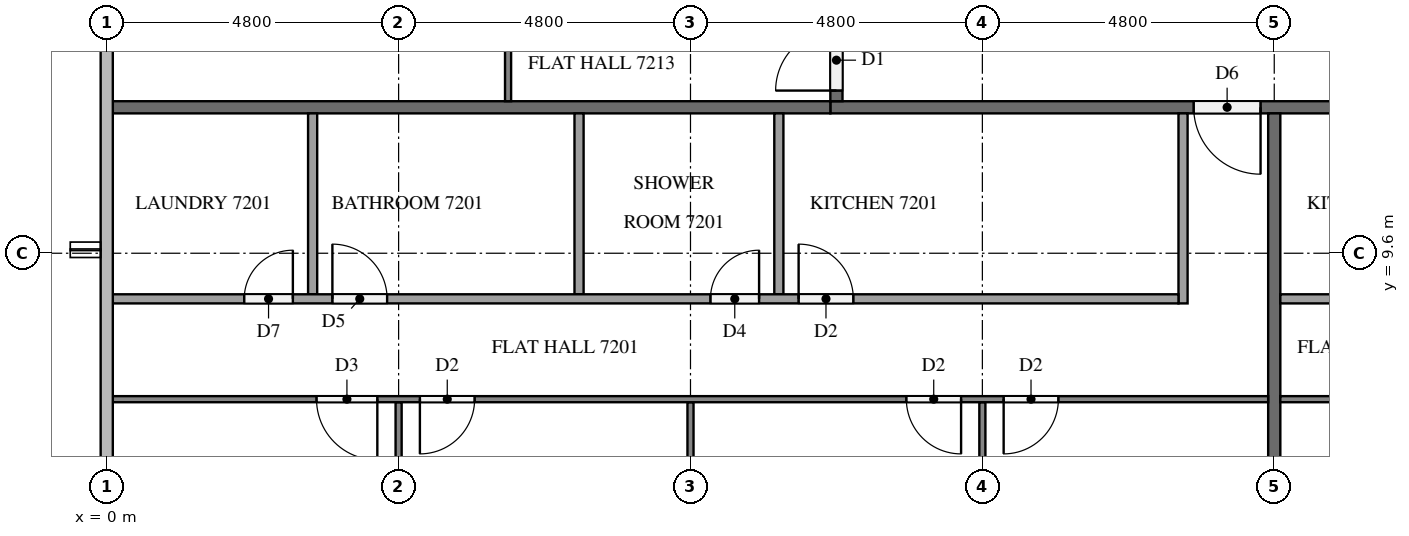
"""IFC4 building model, lengths in metres.
Left out: names, types, materials, properties, quantities, classifications, styles, units other than length and angle.
Written with IfcOpenShell. Run it as: python <this file> out.ifc"""

import sys

from ifc_helpers import new_model, si_unit, direction, frame, frame_2d, origin, place, context, subcontext, project, spatial, rectangle, extrude, element, fill, save


model = new_model("IFC4")
c1 = context("Model", 3, precision=1e-05, world=origin(), true_north=direction((0.0, 1.0)))
c2 = subcontext(c1, "Body", "Model", "MODEL_VIEW")
j1 = project(units=[si_unit("LENGTHUNIT", "METRE"), si_unit("PLANEANGLEUNIT", "RADIAN")], contexts=[c1])
p1 = place(None, origin())
s1 = spatial("IfcSite", under=j1, at=p1, CompositionType="ELEMENT")
p2 = place(p1, origin())
s2 = spatial("IfcBuilding", under=s1, at=p2, CompositionType="ELEMENT")
p3 = place(p2, frame((0.0, 0.0, 275.6)))
s3 = spatial("IfcBuildingStorey", under=s2, at=p3, CompositionType="ELEMENT", Elevation=275.6)
p4 = place(p3, frame((50.5, 12.0, 0.0), z_axis=(0.0, 0.0, 1.0), x_axis=(-1.0, 0.0, 0.0)))
e1 = element("IfcWall", 1, at=p4, inside=s3, PredefinedType="PARTITIONING", context=c2, shape_type="SweptSolid", body=[
    extrude(rectangle(XDim=38.6, YDim=0.2, at=frame_2d((19.3, 0.0))), origin(), (0.0, 0.0, 1.0), 3.2),
])
p5 = place(p4, frame((31.525, 0.0, 0.0)))
e2 = element("IfcOpeningElement", 2, at=p5, cuts=e1, PredefinedType="OPENING", context=c2, shape_type="SweptSolid", body=[
    extrude(rectangle(XDim=1.1, YDim=2.1, at=frame_2d((0.55, 1.05))), frame((0.0, 0.11, 0.0), z_axis=(0.0, -1.0, 0.0), x_axis=(1.0, 0.0, 0.0)), (0.0, 0.0, 1.0), 0.22),
])
p6 = place(p4, frame((19.575, 0.0, 0.0)))
e3 = element("IfcOpeningElement", 3, at=p6, cuts=e1, PredefinedType="OPENING", context=c2, shape_type="SweptSolid", body=[
    extrude(rectangle(XDim=1.0, YDim=2.1, at=frame_2d((0.5, 1.05))), frame((0.0, 0.11, 0.0), z_axis=(0.0, -1.0, 0.0), x_axis=(1.0, 0.0, 0.0)), (0.0, 0.0, 1.0), 0.22),
])
p7 = place(p4, frame((18.025, 0.0, 0.0)))
e4 = element("IfcOpeningElement", 4, at=p7, cuts=e1, PredefinedType="OPENING", context=c2, shape_type="SweptSolid", body=[
    extrude(rectangle(XDim=1.0, YDim=2.1, at=frame_2d((0.5, 1.05))), frame((0.0, 0.11, 0.0), z_axis=(0.0, -1.0, 0.0), x_axis=(1.0, 0.0, 0.0)), (0.0, 0.0, 1.0), 0.22),
])
p8 = place(p4, frame((1.225, 0.0, 0.0)))
e5 = element("IfcOpeningElement", 5, at=p8, cuts=e1, PredefinedType="OPENING", context=c2, shape_type="SweptSolid", body=[
    extrude(rectangle(XDim=1.0, YDim=2.1, at=frame_2d((0.5, 1.05))), frame((0.0, 0.11, 0.0), z_axis=(0.0, -1.0, 0.0), x_axis=(1.0, 0.0, 0.0)), (0.0, 0.0, 1.0), 0.22),
])
p9 = place(p3, frame((12.0, 12.1, 0.0), z_axis=(0.0, 0.0, 1.0), x_axis=(0.0, 1.0, 0.0)))
e6 = element("IfcWall", 6, at=p9, inside=s3, PredefinedType="PARTITIONING", context=c2, shape_type="SweptSolid", body=[
    extrude(rectangle(XDim=28.6, YDim=0.2, at=frame_2d((14.3, 0.0))), origin(), (0.0, 0.0, 1.0), 3.2),
])
p10 = place(p9, frame((24.175, 0.0, 0.0)))
e7 = element("IfcOpeningElement", 7, at=p10, cuts=e6, PredefinedType="OPENING", context=c2, shape_type="SweptSolid", body=[
    extrude(rectangle(XDim=1.0, YDim=2.1, at=frame_2d((0.5, 1.05))), frame((0.0, 0.11, 0.0), z_axis=(0.0, -1.0, 0.0), x_axis=(1.0, 0.0, 0.0)), (0.0, 0.0, 1.0), 0.22),
])
p11 = place(p9, frame((14.575, 0.0, 0.0)))
e8 = element("IfcOpeningElement", 8, at=p11, cuts=e6, PredefinedType="OPENING", context=c2, shape_type="SweptSolid", body=[
    extrude(rectangle(XDim=1.0, YDim=2.1, at=frame_2d((0.5, 1.05))), frame((0.0, 0.11, 0.0), z_axis=(0.0, -1.0, 0.0), x_axis=(1.0, 0.0, 0.0)), (0.0, 0.0, 1.0), 0.22),
])
p12 = place(p9, frame((0.175, 0.0, 0.0)))
e9 = element("IfcOpeningElement", 9, at=p12, cuts=e6, PredefinedType="OPENING", context=c2, shape_type="SweptSolid", body=[
    extrude(rectangle(XDim=1.0, YDim=2.1, at=frame_2d((0.5, 1.05))), frame((0.0, 0.11, 0.0), z_axis=(0.0, -1.0, 0.0), x_axis=(1.0, 0.0, 0.0)), (0.0, 0.0, 1.0), 0.22),
])
for number, where, z_axis, x_axis in (
    (10, (19.2, 11.9, 0.0), (0.0, 0.0, 1.0), (0.0, -1.0, 0.0)),
    (11, (0.1, 12.0, 0.0), (0.0, 0.0, 1.0), (1.0, 0.0, 0.0)),
):
    element("IfcWall", number, at=place(p3, frame(where, z_axis=z_axis, x_axis=x_axis)), inside=s3, PredefinedType="PARTITIONING", context=c2, shape_type="SweptSolid", body=[
        extrude(rectangle(XDim=11.8, YDim=0.2, at=frame_2d((5.9, 0.0))), origin(), (0.0, 0.0, 1.0), 3.2),
    ])
p13 = place(p3, frame((14.4, 7.15, 0.0), z_axis=(0.0, 0.0, 1.0), x_axis=(0.0, -1.0, 0.0)))
e12 = element("IfcWall", 12, at=p13, inside=s3, PredefinedType="PARTITIONING", context=c2, shape_type="SweptSolid", body=[
    extrude(rectangle(XDim=6.9, YDim=0.1, at=frame_2d((3.45, 0.0))), origin(), (0.0, 0.0, 1.0), 3.2),
])
p14 = place(p3, frame((9.6, 7.15, 0.0), z_axis=(0.0, 0.0, 1.0), x_axis=(0.0, -1.0, 0.0)))
e13 = element("IfcWall", 13, at=p14, inside=s3, PredefinedType="PARTITIONING", context=c2, shape_type="SweptSolid", body=[
    extrude(rectangle(XDim=7.05, YDim=0.1, at=frame_2d((3.525, 0.0))), origin(), (0.0, 0.0, 1.0), 3.2),
])
p15 = place(p3, frame((4.8, 7.15, 0.0), z_axis=(0.0, 0.0, 1.0), x_axis=(0.0, -1.0, 0.0)))
e14 = element("IfcWall", 14, at=p15, inside=s3, PredefinedType="PARTITIONING", context=c2, shape_type="SweptSolid", body=[
    extrude(rectangle(XDim=6.85, YDim=0.1, at=frame_2d((3.425, 0.0))), origin(), (0.0, 0.0, 1.0), 3.2),
])
p16 = place(p3, frame((19.1, 7.2, 0.0), z_axis=(0.0, 0.0, 1.0), x_axis=(-1.0, 0.0, 0.0)))
e15 = element("IfcWall", 15, at=p16, inside=s3, PredefinedType="PARTITIONING", context=c2, shape_type="SweptSolid", body=[
    extrude(rectangle(XDim=19.0, YDim=0.1, at=frame_2d((9.5, 0.0))), origin(), (0.0, 0.0, 1.0), 3.2),
])
p17 = place(p16, frame((3.45, 0.0, 0.0)))
e16 = element("IfcOpeningElement", 16, at=p17, cuts=e15, PredefinedType="OPENING", context=c2, shape_type="SweptSolid", body=[
    extrude(rectangle(XDim=0.9, YDim=2.1, at=frame_2d((0.45, 1.05))), frame((0.0, 0.06, 0.0), z_axis=(0.0, -1.0, 0.0), x_axis=(1.0, 0.0, 0.0)), (0.0, 0.0, 1.0), 0.12),
])
p18 = place(p16, frame((5.05, 0.0, 0.0)))
e17 = element("IfcOpeningElement", 17, at=p18, cuts=e15, PredefinedType="OPENING", context=c2, shape_type="SweptSolid", body=[
    extrude(rectangle(XDim=0.9, YDim=2.1, at=frame_2d((0.45, 1.05))), frame((0.0, 0.06, 0.0), z_axis=(0.0, -1.0, 0.0), x_axis=(1.0, 0.0, 0.0)), (0.0, 0.0, 1.0), 0.12),
])
p19 = place(p16, frame((13.05, 0.0, 0.0)))
e18 = element("IfcOpeningElement", 18, at=p19, cuts=e15, PredefinedType="OPENING", context=c2, shape_type="SweptSolid", body=[
    extrude(rectangle(XDim=0.9, YDim=2.1, at=frame_2d((0.45, 1.05))), frame((0.0, 0.06, 0.0), z_axis=(0.0, -1.0, 0.0), x_axis=(1.0, 0.0, 0.0)), (0.0, 0.0, 1.0), 0.12),
])
p20 = place(p16, frame((14.65, 0.0, 0.0)))
e19 = element("IfcOpeningElement", 19, at=p20, cuts=e15, PredefinedType="OPENING", context=c2, shape_type="SweptSolid", body=[
    extrude(rectangle(XDim=1.0, YDim=2.1, at=frame_2d((0.5, 1.05))), frame((0.0, 0.06, 0.0), z_axis=(0.0, -1.0, 0.0), x_axis=(1.0, 0.0, 0.0)), (0.0, 0.0, 1.0), 0.12),
])
for number, where, z_axis, x_axis in (
    (20, (11.053, 11.9, 0.0), (0.0, 0.0, 1.0), (0.0, -1.0, 0.0)),
    (21, (7.767, 11.9, 0.0), (0.0, 0.0, 1.0), (0.0, -1.0, 0.0)),
    (22, (3.386, 11.9, 0.0), (0.0, 0.0, 1.0), (0.0, -1.0, 0.0)),
):
    element("IfcWall", number, at=place(p3, frame(where, z_axis=z_axis, x_axis=x_axis)), inside=s3, PredefinedType="PARTITIONING", context=c2, shape_type="SweptSolid", body=[
        extrude(rectangle(XDim=2.975, YDim=0.15, at=frame_2d((1.487, 0.0))), origin(), (0.0, 0.0, 1.0), 3.2),
    ])
p21 = place(p3, frame((17.7, 11.9, 0.0), z_axis=(0.0, 0.0, 1.0), x_axis=(0.0, -1.0, 0.0)))
e23 = element("IfcWall", 23, at=p21, inside=s3, PredefinedType="PARTITIONING", context=c2, shape_type="SweptSolid", body=[
    extrude(rectangle(XDim=3.125, YDim=0.15, at=frame_2d((1.562, 0.0))), origin(), (0.0, 0.0, 1.0), 3.2),
])
p22 = place(p3, frame((0.1, 8.85, 0.0), z_axis=(0.0, 0.0, 1.0), x_axis=(1.0, 0.0, 0.0)))
e24 = element("IfcWall", 24, at=p22, inside=s3, PredefinedType="PARTITIONING", context=c2, shape_type="SweptSolid", body=[
    extrude(rectangle(XDim=17.525, YDim=0.15, at=frame_2d((8.762, 0.0))), origin(), (0.0, 0.0, 1.0), 3.2),
])
p23 = place(p22, frame((11.278, 0.0, 0.0)))
e25 = element("IfcOpeningElement", 25, at=p23, cuts=e24, PredefinedType="OPENING", context=c2, shape_type="SweptSolid", body=[
    extrude(rectangle(XDim=0.9, YDim=2.1, at=frame_2d((0.45, 1.05))), frame((0.0, 0.085, 0.0), z_axis=(0.0, -1.0, 0.0), x_axis=(1.0, 0.0, 0.0)), (0.0, 0.0, 1.0), 0.17),
])
p24 = place(p22, frame((9.828, 0.0, 0.0)))
e26 = element("IfcOpeningElement", 26, at=p24, cuts=e24, PredefinedType="OPENING", context=c2, shape_type="SweptSolid", body=[
    extrude(rectangle(XDim=0.8, YDim=2.1, at=frame_2d((0.4, 1.05))), frame((0.0, 0.085, 0.0), z_axis=(0.0, -1.0, 0.0), x_axis=(1.0, 0.0, 0.0)), (0.0, 0.0, 1.0), 0.17),
])
p25 = place(p22, frame((3.611, 0.0, 0.0)))
e27 = element("IfcOpeningElement", 27, at=p25, cuts=e24, PredefinedType="OPENING", context=c2, shape_type="SweptSolid", body=[
    extrude(rectangle(XDim=0.9, YDim=2.1, at=frame_2d((0.45, 1.05))), frame((0.0, 0.085, 0.0), z_axis=(0.0, -1.0, 0.0), x_axis=(1.0, 0.0, 0.0)), (0.0, 0.0, 1.0), 0.17),
])
p26 = place(p22, frame((2.161, 0.0, 0.0)))
e28 = element("IfcOpeningElement", 28, at=p26, cuts=e24, PredefinedType="OPENING", context=c2, shape_type="SweptSolid", body=[
    extrude(rectangle(XDim=0.8, YDim=2.1, at=frame_2d((0.4, 1.05))), frame((0.0, 0.085, 0.0), z_axis=(0.0, -1.0, 0.0), x_axis=(1.0, 0.0, 0.0)), (0.0, 0.0, 1.0), 0.17),
])
p27 = place(p3, frame((31.1, 7.2, 0.0), z_axis=(0.0, 0.0, 1.0), x_axis=(-1.0, 0.0, 0.0)))
e29 = element("IfcWall", 29, at=p27, inside=s3, PredefinedType="PARTITIONING", context=c2, shape_type="SweptSolid", body=[
    extrude(rectangle(XDim=11.8, YDim=0.1, at=frame_2d((5.9, 0.0))), origin(), (0.0, 0.0, 1.0), 3.2),
])
p28 = place(p27, frame((3.45, 0.0, 0.0)))
e30 = element("IfcOpeningElement", 30, at=p28, cuts=e29, PredefinedType="OPENING", context=c2, shape_type="SweptSolid", body=[
    extrude(rectangle(XDim=0.9, YDim=2.1, at=frame_2d((0.45, 1.05))), frame((0.0, 0.06, 0.0), z_axis=(0.0, -1.0, 0.0), x_axis=(1.0, 0.0, 0.0)), (0.0, 0.0, 1.0), 0.12),
])
p29 = place(p27, frame((5.05, 0.0, 0.0)))
e31 = element("IfcOpeningElement", 31, at=p29, cuts=e29, PredefinedType="OPENING", context=c2, shape_type="SweptSolid", body=[
    extrude(rectangle(XDim=1.0, YDim=2.1, at=frame_2d((0.5, 1.05))), frame((0.0, 0.06, 0.0), z_axis=(0.0, -1.0, 0.0), x_axis=(1.0, 0.0, 0.0)), (0.0, 0.0, 1.0), 0.12),
])
p30 = place(p3, frame((19.3, 8.85, 0.0), z_axis=(0.0, 0.0, 1.0), x_axis=(1.0, 0.0, 0.0)))
e32 = element("IfcWall", 32, at=p30, inside=s3, PredefinedType="PARTITIONING", context=c2, shape_type="SweptSolid", body=[
    extrude(rectangle(XDim=10.325, YDim=0.15, at=frame_2d((5.163, 0.0))), origin(), (0.0, 0.0, 1.0), 3.2),
])
p31 = place(p30, frame((6.52, 0.0, 0.0)))
e33 = element("IfcOpeningElement", 33, at=p31, cuts=e32, PredefinedType="OPENING", context=c2, shape_type="SweptSolid", body=[
    extrude(rectangle(XDim=0.8, YDim=2.1, at=frame_2d((0.4, 1.05))), frame((0.0, 0.085, 0.0), z_axis=(0.0, -1.0, 0.0), x_axis=(1.0, 0.0, 0.0)), (0.0, 0.0, 1.0), 0.17),
])
p32 = place(p30, frame((4.97, 0.0, 0.0)))
e34 = element("IfcOpeningElement", 34, at=p32, cuts=e32, PredefinedType="OPENING", context=c2, shape_type="SweptSolid", body=[
    extrude(rectangle(XDim=0.9, YDim=2.1, at=frame_2d((0.45, 1.05))), frame((0.0, 0.085, 0.0), z_axis=(0.0, -1.0, 0.0), x_axis=(1.0, 0.0, 0.0)), (0.0, 0.0, 1.0), 0.17),
])
p33 = place(p3, frame((6.6, 12.1, 0.0), z_axis=(0.0, 0.0, 1.0), x_axis=(0.0, 1.0, 0.0)))
e35 = element("IfcWall", 35, at=p33, inside=s3, PredefinedType="PARTITIONING", context=c2, shape_type="SweptSolid", body=[
    extrude(rectangle(XDim=14.2, YDim=0.1, at=frame_2d((7.1, 0.0))), origin(), (0.0, 0.0, 1.0), 3.2),
])
p34 = place(p33, frame((3.35, 0.0, 0.0)))
e36 = element("IfcOpeningElement", 36, at=p34, cuts=e35, PredefinedType="OPENING", context=c2, shape_type="SweptSolid", body=[
    extrude(rectangle(XDim=1.0, YDim=2.1, at=frame_2d((0.5, 1.05))), frame((0.0, 0.06, 0.0), z_axis=(0.0, -1.0, 0.0), x_axis=(1.0, 0.0, 0.0)), (0.0, 0.0, 1.0), 0.12),
])
p35 = place(p33, frame((5.05, 0.0, 0.0)))
e37 = element("IfcOpeningElement", 37, at=p35, cuts=e35, PredefinedType="OPENING", context=c2, shape_type="SweptSolid", body=[
    extrude(rectangle(XDim=0.9, YDim=2.1, at=frame_2d((0.45, 1.05))), frame((0.0, 0.06, 0.0), z_axis=(0.0, -1.0, 0.0), x_axis=(1.0, 0.0, 0.0)), (0.0, 0.0, 1.0), 0.12),
])
p36 = place(p33, frame((13.0, 0.0, 0.0)))
e38 = element("IfcOpeningElement", 38, at=p36, cuts=e35, PredefinedType="OPENING", context=c2, shape_type="SweptSolid", body=[
    extrude(rectangle(XDim=0.9, YDim=2.1, at=frame_2d((0.45, 1.05))), frame((0.0, 0.06, 0.0), z_axis=(0.0, -1.0, 0.0), x_axis=(1.0, 0.0, 0.0)), (0.0, 0.0, 1.0), 0.12),
])
p37 = place(p5, origin())
e39 = element("IfcDoor", 39, at=p37, inside=s3, OperationType="SINGLE_SWING_LEFT", PredefinedType="DOOR", context=c2, shape_type="SweptSolid", body=[
    extrude(rectangle(XDim=1.1, YDim=2.1, at=frame_2d((0.55, 1.05))), frame((0.0, 0.025, 0.0), z_axis=(0.0, -1.0, 0.0), x_axis=(1.0, 0.0, 0.0)), (0.0, 0.0, 1.0), 0.05),
])
fill(e2, e39)
p38 = place(p12, origin())
e40 = element("IfcDoor", 40, at=p38, inside=s3, OperationType="SINGLE_SWING_LEFT", PredefinedType="DOOR", context=c2, shape_type="SweptSolid", body=[
    extrude(rectangle(XDim=1.0, YDim=2.1, at=frame_2d((0.5, 1.05))), frame((0.0, 0.025, 0.0), z_axis=(0.0, -1.0, 0.0), x_axis=(1.0, 0.0, 0.0)), (0.0, 0.0, 1.0), 0.05),
])
fill(e9, e40)
p39 = place(p17, origin())
e41 = element("IfcDoor", 41, at=p39, inside=s3, OperationType="SINGLE_SWING_RIGHT", PredefinedType="DOOR", context=c2, shape_type="SweptSolid", body=[
    extrude(rectangle(XDim=0.9, YDim=2.1, at=frame_2d((0.45, 1.05))), frame((0.0, 0.025, 0.0), z_axis=(0.0, -1.0, 0.0), x_axis=(1.0, 0.0, 0.0)), (0.0, 0.0, 1.0), 0.05),
])
fill(e16, e41)
p40 = place(p18, origin())
e42 = element("IfcDoor", 42, at=p40, inside=s3, OperationType="SINGLE_SWING_LEFT", PredefinedType="DOOR", context=c2, shape_type="SweptSolid", body=[
    extrude(rectangle(XDim=0.9, YDim=2.1, at=frame_2d((0.45, 1.05))), frame((0.0, 0.025, 0.0), z_axis=(0.0, -1.0, 0.0), x_axis=(1.0, 0.0, 0.0)), (0.0, 0.0, 1.0), 0.05),
])
fill(e17, e42)
p41 = place(p19, origin())
e43 = element("IfcDoor", 43, at=p41, inside=s3, OperationType="SINGLE_SWING_RIGHT", PredefinedType="DOOR", context=c2, shape_type="SweptSolid", body=[
    extrude(rectangle(XDim=0.9, YDim=2.1, at=frame_2d((0.45, 1.05))), frame((0.0, 0.025, 0.0), z_axis=(0.0, -1.0, 0.0), x_axis=(1.0, 0.0, 0.0)), (0.0, 0.0, 1.0), 0.05),
])
fill(e18, e43)
p42 = place(p20, origin())
e44 = element("IfcDoor", 44, at=p42, inside=s3, OperationType="SINGLE_SWING_LEFT", PredefinedType="DOOR", context=c2, shape_type="SweptSolid", body=[
    extrude(rectangle(XDim=1.0, YDim=2.1, at=frame_2d((0.5, 1.05))), frame((0.0, 0.025, 0.0), z_axis=(0.0, -1.0, 0.0), x_axis=(1.0, 0.0, 0.0)), (0.0, 0.0, 1.0), 0.05),
])
fill(e19, e44)
p43 = place(p23, origin())
e45 = element("IfcDoor", 45, at=p43, inside=s3, OperationType="SINGLE_SWING_LEFT", PredefinedType="DOOR", context=c2, shape_type="SweptSolid", body=[
    extrude(rectangle(XDim=0.9, YDim=2.1, at=frame_2d((0.45, 1.05))), frame((0.0, 0.025, 0.0), z_axis=(0.0, -1.0, 0.0), x_axis=(1.0, 0.0, 0.0)), (0.0, 0.0, 1.0), 0.05),
])
fill(e25, e45)
p44 = place(p24, origin())
e46 = element("IfcDoor", 46, at=p44, inside=s3, OperationType="SINGLE_SWING_RIGHT", PredefinedType="DOOR", context=c2, shape_type="SweptSolid", body=[
    extrude(rectangle(XDim=0.8, YDim=2.1, at=frame_2d((0.4, 1.05))), frame((0.0, 0.025, 0.0), z_axis=(0.0, -1.0, 0.0), x_axis=(1.0, 0.0, 0.0)), (0.0, 0.0, 1.0), 0.05),
])
fill(e26, e46)
p45 = place(p25, origin())
e47 = element("IfcDoor", 47, at=p45, inside=s3, OperationType="SINGLE_SWING_LEFT", PredefinedType="DOOR", context=c2, shape_type="SweptSolid", body=[
    extrude(rectangle(XDim=0.9, YDim=2.1, at=frame_2d((0.45, 1.05))), frame((0.0, 0.025, 0.0), z_axis=(0.0, -1.0, 0.0), x_axis=(1.0, 0.0, 0.0)), (0.0, 0.0, 1.0), 0.05),
])
fill(e27, e47)
p46 = place(p26, origin())
e48 = element("IfcDoor", 48, at=p46, inside=s3, OperationType="SINGLE_SWING_RIGHT", PredefinedType="DOOR", context=c2, shape_type="SweptSolid", body=[
    extrude(rectangle(XDim=0.8, YDim=2.1, at=frame_2d((0.4, 1.05))), frame((0.0, 0.025, 0.0), z_axis=(0.0, -1.0, 0.0), x_axis=(1.0, 0.0, 0.0)), (0.0, 0.0, 1.0), 0.05),
])
fill(e28, e48)
save(model, sys.argv[1])
